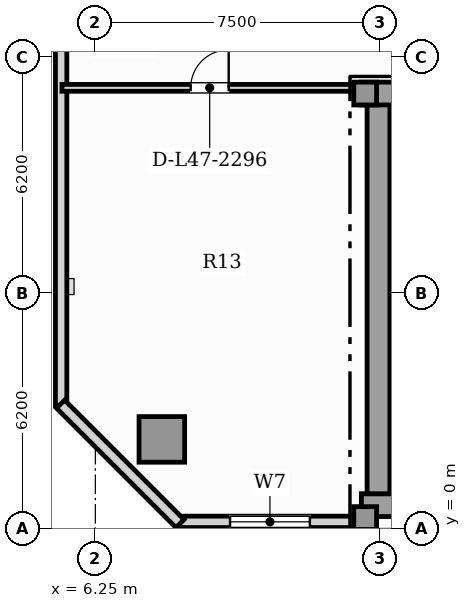
"""IFC4 building model, lengths in metres.
Left out: names, types, materials, properties, quantities, classifications, styles, units other than length and angle.
Written with IfcOpenShell. Run it as: python <this file> out.ifc"""

import sys

from ifc_helpers import new_model, si_unit, direction, frame, frame_2d, origin, origin_2d, place, context, subcontext, project, spatial, rectangle, hollow_rectangle, extrude, element, fill, save


model = new_model("IFC4")
c1 = context("Model", 3, precision=1e-05, world=origin(), true_north=direction((0.0, 1.0)))
c2 = subcontext(c1, "Body", "Model", "MODEL_VIEW")
j1 = project(units=[si_unit("LENGTHUNIT", "METRE"), si_unit("PLANEANGLEUNIT", "RADIAN")], contexts=[c1])
p1 = place(None, origin())
s1 = spatial("IfcSite", under=j1, at=p1, CompositionType="ELEMENT")
p2 = place(p1, origin())
s2 = spatial("IfcBuilding", under=s1, at=p2, CompositionType="ELEMENT")
p3 = place(p2, frame((0.0, 0.0, 192.6)))
s3 = spatial("IfcBuildingStorey", under=s2, at=p3, CompositionType="ELEMENT", Elevation=192.6)
p4 = place(p3, frame((13.25, 0.62, 0.0), z_axis=(0.0, 0.0, 1.0), x_axis=(1.0, 0.0, 0.0)))
e1 = element("IfcWall", 1, at=p4, inside=s3, PredefinedType="SHEAR", context=c2, shape_type="SweptSolid", body=[
    extrude(rectangle(XDim=31.0, YDim=0.6, at=frame_2d((15.5, 0.0))), origin(), (0.0, 0.0, 1.0), 3.63),
])
p5 = place(p3, frame((13.7, 0.92, 0.0), z_axis=(0.0, 0.0, 1.0), x_axis=(0.0, 1.0, 0.0)))
e2 = element("IfcWall", 2, at=p5, inside=s3, PredefinedType="SHEAR", context=c2, shape_type="SweptSolid", body=[
    extrude(rectangle(XDim=10.53, YDim=0.6, at=frame_2d((5.265, 0.0))), origin(), (0.0, 0.0, 1.0), 3.63),
])
p6 = place(p3, frame((13.25, 11.45, 0.0), z_axis=(0.0, 0.0, 1.0), x_axis=(1.0, 0.0, 0.0)))
e3 = element("IfcWall", 3, at=p6, inside=s3, PredefinedType="SHEAR", context=c2, shape_type="SweptSolid", body=[
    extrude(rectangle(XDim=2.95, YDim=0.6, at=frame_2d((1.475, 0.0))), origin(), (0.0, 0.0, 1.0), 3.63),
])
for number, where, z_axis, x_axis in (
    (4, (13.35, 0.28, 0.0), (0.0, 0.0, 1.0), (1.0, 0.0, 0.0)),
    (5, (13.35, 11.45, 0.0), (0.0, 0.0, 1.0), (1.0, 0.0, 0.0)),
):
    element("IfcColumn", number, at=place(p3, frame(where, z_axis=z_axis, x_axis=x_axis)), inside=s3, PredefinedType="COLUMN", context=c2, shape_type="SweptSolid", body=[
        extrude(rectangle(XDim=0.6, YDim=0.6, at=origin_2d()), origin(), (0.0, 0.0, 1.0), 3.85),
    ])
p7 = place(p3, frame((8.0, 2.35, 0.0), z_axis=(0.0, 0.0, 1.0), x_axis=(1.0, 0.0, 0.0)))
e6 = element("IfcColumn", 6, at=p7, inside=s3, PredefinedType="USERDEFINED", context=c2, shape_type="SweptSolid", body=[
    extrude(hollow_rectangle(XDim=1.2, YDim=1.2, WallThickness=0.07, at=origin_2d()), origin(), (0.0, 0.0, 1.0), 3.85),
])
p8 = place(p3, frame((8.44, 0.18, 0.0), z_axis=(0.0, 0.0, 1.0), x_axis=(1.0, 0.0, 0.0)))
e7 = element("IfcWall", 7, at=p8, inside=s3, PredefinedType="SOLIDWALL", context=c2, shape_type="SweptSolid", body=[
    extrude(rectangle(XDim=4.81, YDim=0.3, at=frame_2d((2.405, 0.0))), origin(), (0.0, 0.0, 1.0), 3.63),
])
p9 = place(p8, frame((1.355, 0.0, 0.85)))
e8 = element("IfcOpeningElement", 8, at=p9, cuts=e7, PredefinedType="OPENING", context=c2, shape_type="SweptSolid", body=[
    extrude(rectangle(XDim=2.1, YDim=2.05, at=frame_2d((1.05, 1.025))), frame((0.0, 0.16, 0.0), z_axis=(0.0, -1.0, 0.0), x_axis=(1.0, 0.0, 0.0)), (0.0, 0.0, 1.0), 0.32),
])
p10 = place(p3, frame((5.35, 37.16, 0.0), z_axis=(0.0, 0.0, 1.0), x_axis=(0.0, -1.0, 0.0)))
e9 = element("IfcWall", 9, at=p10, inside=s3, PredefinedType="SOLIDWALL", context=c2, shape_type="SweptSolid", body=[
    extrude(rectangle(XDim=33.92, YDim=0.3, at=frame_2d((16.96, 0.0))), origin(), (0.0, 0.0, 1.0), 3.63),
])
p11 = place(p10, frame((2.46, 0.0, 0.95)))
e10 = element("IfcOpeningElement", 10, at=p11, cuts=e9, PredefinedType="OPENING", context=c2, shape_type="SweptSolid", body=[
    extrude(rectangle(XDim=0.9, YDim=1.5, at=frame_2d((0.45, 0.75))), frame((0.0, 0.16, 0.0), z_axis=(0.0, -1.0, 0.0), x_axis=(1.0, 0.0, 0.0)), (0.0, 0.0, 1.0), 0.32),
])
p12 = place(p10, frame((17.715, 0.0, 0.9)))
e11 = element("IfcOpeningElement", 11, at=p12, cuts=e9, PredefinedType="OPENING", context=c2, shape_type="SweptSolid", body=[
    extrude(rectangle(XDim=1.5, YDim=1.95, at=frame_2d((0.75, 0.975))), frame((0.0, 0.16, 0.0), z_axis=(0.0, -1.0, 0.0), x_axis=(1.0, 0.0, 0.0)), (0.0, 0.0, 1.0), 0.32),
])
p13 = place(p10, frame((9.287, 0.0, 0.9)))
e12 = element("IfcOpeningElement", 12, at=p13, cuts=e9, PredefinedType="OPENING", context=c2, shape_type="SweptSolid", body=[
    extrude(rectangle(XDim=1.5, YDim=1.95, at=frame_2d((0.75, 0.975))), frame((0.0, 0.16, 0.0), z_axis=(0.0, -1.0, 0.0), x_axis=(1.0, 0.0, 0.0)), (0.0, 0.0, 1.0), 0.32),
])
p14 = place(p3, frame((5.334, 3.278, 0.0), z_axis=(0.0, 0.0, 1.0), x_axis=(0.707106781187, -0.707106781187, 0.0)))
e13 = element("IfcWall", 13, at=p14, inside=s3, PredefinedType="SOLIDWALL", context=c2, shape_type="SweptSolid", body=[
    extrude(rectangle(XDim=4.445, YDim=0.3, at=frame_2d((2.223, 0.0))), origin(), (0.0, 0.0, 1.0), 3.63),
])
p15 = place(p3, frame((14.04, 8.52, 0.0), z_axis=(0.0, 0.0, 1.0), x_axis=(1.0, 0.0, 0.0)))
e14 = element("IfcWall", 14, at=p15, inside=s3, PredefinedType="SOLIDWALL", context=c2, shape_type="SweptSolid", body=[
    extrude(rectangle(XDim=3.4, YDim=0.22, at=frame_2d((1.7, 0.0))), origin(), (0.0, 0.0, 1.0), 3.63),
])
p16 = place(p15, frame((1.125, 0.0, 0.0)))
e15 = element("IfcOpeningElement", 15, at=p16, cuts=e14, PredefinedType="OPENING", context=c2, shape_type="SweptSolid", body=[
    extrude(rectangle(XDim=1.15, YDim=2.2, at=frame_2d((0.575, 1.1))), frame((0.0, 0.12, 0.0), z_axis=(0.0, -1.0, 0.0), x_axis=(1.0, 0.0, 0.0)), (0.0, 0.0, 1.0), 0.24),
])
p17 = place(p3, frame((5.373, 11.6, 0.0), z_axis=(0.0, 0.0, 1.0), x_axis=(1.0, 0.0, 0.0)))
e16 = element("IfcWall", 16, at=p17, inside=s3, PredefinedType="PARTITIONING", context=c2, shape_type="SweptSolid", body=[
    extrude(rectangle(XDim=7.772, YDim=0.18, at=frame_2d((3.886, 0.0))), origin(), (0.0, 0.0, 1.0), 3.63),
])
p18 = place(p17, frame((3.386, 0.0, 0.0)))
e17 = element("IfcOpeningElement", 17, at=p18, cuts=e16, PredefinedType="OPENING", context=c2, shape_type="SweptSolid", body=[
    extrude(rectangle(XDim=1.0, YDim=2.15, at=frame_2d((0.5, 1.075))), frame((0.0, 0.1, 0.0), z_axis=(0.0, -1.0, 0.0), x_axis=(1.0, 0.0, 0.0)), (0.0, 0.0, 1.0), 0.2),
])
p19 = place(p9, origin())
e18 = element("IfcWindow", 18, at=p19, inside=s3, PartitioningType="SINGLE_PANEL", PredefinedType="WINDOW", context=c2, shape_type="SweptSolid", body=[
    extrude(rectangle(XDim=2.1, YDim=2.05, at=frame_2d((1.05, 1.025))), frame((0.0, 0.03, 0.0), z_axis=(0.0, -1.0, 0.0), x_axis=(1.0, 0.0, 0.0)), (0.0, 0.0, 1.0), 0.06),
])
fill(e8, e18)
p20 = place(p18, origin())
e19 = element("IfcDoor", 19, at=p20, inside=s3, OperationType="SINGLE_SWING_RIGHT", PredefinedType="DOOR", context=c2, shape_type="SweptSolid", body=[
    extrude(rectangle(XDim=1.0, YDim=2.15, at=frame_2d((0.5, 1.075))), frame((0.0, 0.025, 0.0), z_axis=(0.0, -1.0, 0.0), x_axis=(1.0, 0.0, 0.0)), (0.0, 0.0, 1.0), 0.05),
])
fill(e17, e19)
save(model, sys.argv[1])
